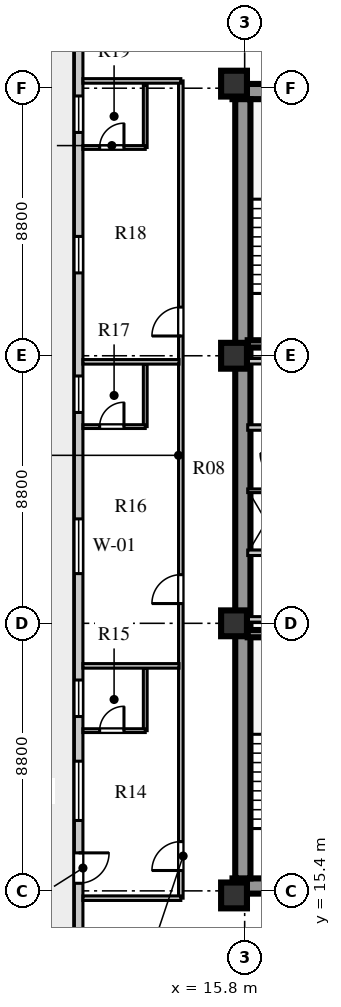
"""IFC4 building model, lengths in metres.
Left out: names, types, materials, properties, quantities, classifications, styles, units other than length and angle.
Written with IfcOpenShell. Run it as: python <this file> out.ifc"""

import sys

from ifc_helpers import new_model, si_unit, direction, frame, frame_2d, origin, origin_2d, place, context, subcontext, project, spatial, rectangle, extrude, element, fill, save


model = new_model("IFC4")
c1 = context("Model", 3, precision=1e-05, world=origin(), true_north=direction((0.0, 1.0)))
c2 = subcontext(c1, "Body", "Model", "MODEL_VIEW")
j1 = project(units=[si_unit("LENGTHUNIT", "METRE"), si_unit("PLANEANGLEUNIT", "RADIAN")], contexts=[c1])
p1 = place(None, origin())
s1 = spatial("IfcSite", under=j1, at=p1, CompositionType="ELEMENT")
p2 = place(p1, origin())
s2 = spatial("IfcBuilding", under=s1, at=p2, CompositionType="ELEMENT")
p3 = place(p2, frame((0.0, 0.0, 134.8)))
s3 = spatial("IfcBuildingStorey", under=s2, at=p3, CompositionType="ELEMENT", Elevation=134.8)
for number, where, z_axis, x_axis in (
    (1, (15.4, 15.56, 0.0), (0.0, 0.0, 1.0), (1.0, 0.0, 0.0)),
    (2, (15.4, 41.69, 0.0), (0.0, 0.0, 1.0), (1.0, 0.0, 0.0)),
):
    element("IfcWall", number, at=place(p3, frame(where, z_axis=z_axis, x_axis=x_axis)), inside=s3, PredefinedType="SHEAR", context=c2, shape_type="SweptSolid", body=[
        extrude(rectangle(XDim=9.68, YDim=0.5, at=frame_2d((4.84, 0.0))), origin(), (0.0, 0.0, 1.0), 3.6),
    ])
p4 = place(p3, frame((15.74, 15.81, 0.0), z_axis=(0.0, 0.0, 1.0), x_axis=(0.0, 1.0, 0.0)))
e3 = element("IfcWall", 3, at=p4, inside=s3, PredefinedType="SHEAR", context=c2, shape_type="SweptSolid", body=[
    extrude(rectangle(XDim=25.63, YDim=0.5, at=frame_2d((12.815, 0.0))), origin(), (0.0, 0.0, 1.0), 3.6),
])
for number, where, z_axis, x_axis in (
    (4, (15.45, 15.25, 0.0), (0.0, 0.0, 1.0), (1.0, 0.0, 0.0)),
    (5, (15.45, 24.2, 0.0), (0.0, 0.0, 1.0), (1.0, 0.0, 0.0)),
    (6, (15.45, 33.0, 0.0), (0.0, 0.0, 1.0), (1.0, 0.0, 0.0)),
    (7, (15.45, 41.95, 0.0), (0.0, 0.0, 1.0), (1.0, 0.0, 0.0)),
):
    element("IfcColumn", number, at=place(p3, frame(where, z_axis=z_axis, x_axis=x_axis)), inside=s3, PredefinedType="COLUMN", context=c2, shape_type="SweptSolid", body=[
        extrude(rectangle(XDim=0.85, YDim=0.85, at=origin_2d()), origin(), (0.0, 0.0, 1.0), 3.6),
    ])
p5 = place(p3, frame((10.34, 43.87, 0.0), z_axis=(0.0, 0.0, 1.0), x_axis=(0.0, -1.0, 0.0)))
e8 = element("IfcWall", 8, at=p5, inside=s3, PredefinedType="STANDARD", context=c2, shape_type="SweptSolid", body=[
    extrude(rectangle(XDim=30.54, YDim=0.28, at=frame_2d((15.27, 0.0))), origin(), (0.0, 0.0, 1.0), 3.6),
])
p6 = place(p5, frame((27.22, 0.0, 0.0)))
e9 = element("IfcOpeningElement", 9, at=p6, cuts=e8, PredefinedType="OPENING", context=c2, shape_type="SweptSolid", body=[
    extrude(rectangle(XDim=1.0, YDim=2.05, at=frame_2d((0.5, 1.025))), frame((0.0, 0.15, 0.0), z_axis=(0.0, -1.0, 0.0), x_axis=(1.0, 0.0, 0.0)), (0.0, 0.0, 1.0), 0.3),
])
p7 = place(p5, frame((24.205, 0.0, 0.8)))
e10 = element("IfcOpeningElement", 10, at=p7, cuts=e8, PredefinedType="OPENING", context=c2, shape_type="SweptSolid", body=[
    extrude(rectangle(XDim=1.95, YDim=2.0, at=frame_2d((0.975, 1.0))), frame((0.0, 0.15, 0.0), z_axis=(0.0, -1.0, 0.0), x_axis=(1.0, 0.0, 0.0)), (0.0, 0.0, 1.0), 0.3),
])
p8 = place(p5, frame((21.535, 0.0, 0.8)))
e11 = element("IfcOpeningElement", 11, at=p8, cuts=e8, PredefinedType="OPENING", context=c2, shape_type="SweptSolid", body=[
    extrude(rectangle(XDim=1.2, YDim=1.75, at=frame_2d((0.6, 0.875))), frame((0.0, 0.15, 0.0), z_axis=(0.0, -1.0, 0.0), x_axis=(1.0, 0.0, 0.0)), (0.0, 0.0, 1.0), 0.3),
])
p9 = place(p5, frame((16.235, 0.0, 0.8)))
e12 = element("IfcOpeningElement", 12, at=p9, cuts=e8, PredefinedType="OPENING", context=c2, shape_type="SweptSolid", body=[
    extrude(rectangle(XDim=1.8, YDim=2.0, at=frame_2d((0.9, 1.0))), frame((0.0, 0.15, 0.0), z_axis=(0.0, -1.0, 0.0), x_axis=(1.0, 0.0, 0.0)), (0.0, 0.0, 1.0), 0.3),
])
p10 = place(p5, frame((11.535, 0.0, 0.8)))
e13 = element("IfcOpeningElement", 13, at=p10, cuts=e8, PredefinedType="OPENING", context=c2, shape_type="SweptSolid", body=[
    extrude(rectangle(XDim=1.2, YDim=1.75, at=frame_2d((0.6, 0.875))), frame((0.0, 0.15, 0.0), z_axis=(0.0, -1.0, 0.0), x_axis=(1.0, 0.0, 0.0)), (0.0, 0.0, 1.0), 0.3),
])
p11 = place(p5, frame((6.945, 0.0, 0.8)))
e14 = element("IfcOpeningElement", 14, at=p11, cuts=e8, PredefinedType="OPENING", context=c2, shape_type="SweptSolid", body=[
    extrude(rectangle(XDim=1.2, YDim=1.75, at=frame_2d((0.6, 0.875))), frame((0.0, 0.15, 0.0), z_axis=(0.0, -1.0, 0.0), x_axis=(1.0, 0.0, 0.0)), (0.0, 0.0, 1.0), 0.3),
])
p12 = place(p5, frame((2.325, 0.0, 0.8)))
e15 = element("IfcOpeningElement", 15, at=p12, cuts=e8, PredefinedType="OPENING", context=c2, shape_type="SweptSolid", body=[
    extrude(rectangle(XDim=1.2, YDim=1.75, at=frame_2d((0.6, 0.875))), frame((0.0, 0.15, 0.0), z_axis=(0.0, -1.0, 0.0), x_axis=(1.0, 0.0, 0.0)), (0.0, 0.0, 1.0), 0.3),
])
p13 = place(p3, frame((15.9, 23.86, 0.0), z_axis=(0.0, 0.0, 1.0), x_axis=(1.0, 0.0, 0.0)))
e16 = element("IfcWall", 16, at=p13, inside=s3, PredefinedType="SHEAR", context=c2, shape_type="SweptSolid", body=[
    extrude(rectangle(XDim=3.52, YDim=0.24, at=frame_2d((1.76, 0.0))), origin(), (0.0, 0.0, 1.0), 3.85),
])
p14 = place(p3, frame((15.9, 26.52, 0.0), z_axis=(0.0, 0.0, 1.0), x_axis=(1.0, 0.0, 0.0)))
e17 = element("IfcWall", 17, at=p14, inside=s3, PredefinedType="SOLIDWALL", context=c2, shape_type="SweptSolid", body=[
    extrude(rectangle(XDim=8.68, YDim=0.18, at=frame_2d((4.34, 0.0))), origin(), (0.0, 0.0, 1.0), 3.6),
])
p15 = place(p14, frame((2.05, 0.0, 0.0)))
e18 = element("IfcOpeningElement", 18, at=p15, cuts=e17, PredefinedType="OPENING", context=c2, shape_type="SweptSolid", body=[
    extrude(rectangle(XDim=0.85, YDim=2.06, at=frame_2d((0.425, 1.03))), frame((0.0, 0.1, 0.0), z_axis=(0.0, -1.0, 0.0), x_axis=(1.0, 0.0, 0.0)), (0.0, 0.0, 1.0), 0.2),
])
p16 = place(p14, frame((5.2, 0.0, 0.0)))
e19 = element("IfcOpeningElement", 19, at=p16, cuts=e17, PredefinedType="OPENING", context=c2, shape_type="SweptSolid", body=[
    extrude(rectangle(XDim=0.95, YDim=2.1, at=frame_2d((0.475, 1.05))), frame((0.0, 0.1, 0.0), z_axis=(0.0, -1.0, 0.0), x_axis=(1.0, 0.0, 0.0)), (0.0, 0.0, 1.0), 0.2),
])
p17 = place(p3, frame((15.9, 24.33, 0.0), z_axis=(0.0, 0.0, 1.0), x_axis=(1.0, 0.0, 0.0)))
e20 = element("IfcWall", 20, at=p17, inside=s3, PredefinedType="SOLIDWALL", context=c2, shape_type="SweptSolid", body=[
    extrude(rectangle(XDim=8.68, YDim=0.18, at=frame_2d((4.34, 0.0))), origin(), (0.0, 0.0, 1.0), 2.95),
])
p18 = place(p3, frame((15.9, 28.56, 0.0), z_axis=(0.0, 0.0, 1.0), x_axis=(1.0, 0.0, 0.0)))
e21 = element("IfcWall", 21, at=p18, inside=s3, PredefinedType="PARTITIONING", context=c2, shape_type="SweptSolid", body=[
    extrude(rectangle(XDim=1.2, YDim=0.12, at=frame_2d((0.6, 0.0))), origin(), (0.0, 0.0, 1.0), 3.6),
])
p19 = place(p3, frame((15.9, 30.64, 0.0), z_axis=(0.0, 0.0, 1.0), x_axis=(1.0, 0.0, 0.0)))
e22 = element("IfcWall", 22, at=p19, inside=s3, PredefinedType="SOLIDWALL", context=c2, shape_type="SweptSolid", body=[
    extrude(rectangle(XDim=8.68, YDim=0.18, at=frame_2d((4.34, 0.0))), origin(), (0.0, 0.0, 1.0), 3.6),
])
p20 = place(p19, frame((1.76, 0.0, 0.0)))
e23 = element("IfcOpeningElement", 23, at=p20, cuts=e22, PredefinedType="OPENING", context=c2, shape_type="SweptSolid", body=[
    extrude(rectangle(XDim=1.0, YDim=2.1, at=frame_2d((0.5, 1.05))), frame((0.0, 0.1, 0.0), z_axis=(0.0, -1.0, 0.0), x_axis=(1.0, 0.0, 0.0)), (0.0, 0.0, 1.0), 0.2),
])
p21 = place(p19, frame((3.6, 0.0, 0.0)))
e24 = element("IfcOpeningElement", 24, at=p21, cuts=e22, PredefinedType="OPENING", context=c2, shape_type="SweptSolid", body=[
    extrude(rectangle(XDim=1.0, YDim=2.1, at=frame_2d((0.5, 1.05))), frame((0.0, 0.1, 0.0), z_axis=(0.0, -1.0, 0.0), x_axis=(1.0, 0.0, 0.0)), (0.0, 0.0, 1.0), 0.2),
])
p22 = place(p19, frame((5.44, 0.0, 0.0)))
e25 = element("IfcOpeningElement", 25, at=p22, cuts=e22, PredefinedType="OPENING", context=c2, shape_type="SweptSolid", body=[
    extrude(rectangle(XDim=1.0, YDim=2.1, at=frame_2d((0.5, 1.05))), frame((0.0, 0.1, 0.0), z_axis=(0.0, -1.0, 0.0), x_axis=(1.0, 0.0, 0.0)), (0.0, 0.0, 1.0), 0.2),
])
p23 = place(p19, frame((7.28, 0.0, 0.0)))
e26 = element("IfcOpeningElement", 26, at=p23, cuts=e22, PredefinedType="OPENING", context=c2, shape_type="SweptSolid", body=[
    extrude(rectangle(XDim=1.0, YDim=2.1, at=frame_2d((0.5, 1.05))), frame((0.0, 0.1, 0.0), z_axis=(0.0, -1.0, 0.0), x_axis=(1.0, 0.0, 0.0)), (0.0, 0.0, 1.0), 0.2),
])
p24 = place(p3, frame((15.9, 32.82, 0.0), z_axis=(0.0, 0.0, 1.0), x_axis=(1.0, 0.0, 0.0)))
e27 = element("IfcWall", 27, at=p24, inside=s3, PredefinedType="SOLIDWALL", context=c2, shape_type="SweptSolid", body=[
    extrude(rectangle(XDim=8.68, YDim=0.18, at=frame_2d((4.34, 0.0))), origin(), (0.0, 0.0, 1.0), 2.95),
])
p25 = place(p3, frame((15.9, 33.39, 0.0), z_axis=(0.0, 0.0, 1.0), x_axis=(1.0, 0.0, 0.0)))
e28 = element("IfcWall", 28, at=p25, inside=s3, PredefinedType="SHEAR", context=c2, shape_type="SweptSolid", body=[
    extrude(rectangle(XDim=3.52, YDim=0.24, at=frame_2d((1.76, 0.0))), origin(), (0.0, 0.0, 1.0), 3.85),
])
p26 = place(p3, frame((13.7, 15.16, 0.0), z_axis=(0.0, 0.0, 1.0), x_axis=(0.0, 1.0, 0.0)))
e29 = element("IfcWall", 29, at=p26, inside=s3, PredefinedType="PARTITIONING", context=c2, shape_type="SweptSolid", body=[
    extrude(rectangle(XDim=26.88, YDim=0.15, at=frame_2d((13.44, 0.0))), origin(), (0.0, 0.0, 1.0), 3.6),
])
p27 = place(p26, frame((0.91, 0.0, 0.0)))
e30 = element("IfcOpeningElement", 30, at=p27, cuts=e29, PredefinedType="OPENING", context=c2, shape_type="SweptSolid", body=[
    extrude(rectangle(XDim=0.95, YDim=2.1, at=frame_2d((0.475, 1.05))), frame((0.0, 0.085, 0.0), z_axis=(0.0, -1.0, 0.0), x_axis=(1.0, 0.0, 0.0)), (0.0, 0.0, 1.0), 0.17),
])
p28 = place(p26, frame((9.69, 0.0, 0.0)))
e31 = element("IfcOpeningElement", 31, at=p28, cuts=e29, PredefinedType="OPENING", context=c2, shape_type="SweptSolid", body=[
    extrude(rectangle(XDim=0.95, YDim=2.1, at=frame_2d((0.475, 1.05))), frame((0.0, 0.085, 0.0), z_axis=(0.0, -1.0, 0.0), x_axis=(1.0, 0.0, 0.0)), (0.0, 0.0, 1.0), 0.17),
])
p29 = place(p26, frame((18.49, 0.0, 0.0)))
e32 = element("IfcOpeningElement", 32, at=p29, cuts=e29, PredefinedType="OPENING", context=c2, shape_type="SweptSolid", body=[
    extrude(rectangle(XDim=0.95, YDim=2.1, at=frame_2d((0.475, 1.05))), frame((0.0, 0.085, 0.0), z_axis=(0.0, -1.0, 0.0), x_axis=(1.0, 0.0, 0.0)), (0.0, 0.0, 1.0), 0.17),
])
for number, where, z_axis, x_axis in (
    (33, (10.48, 15.16, 0.0), (0.0, 0.0, 1.0), (1.0, 0.0, 0.0)),
    (34, (10.48, 42.04, 0.0), (0.0, 0.0, 1.0), (1.0, 0.0, 0.0)),
):
    element("IfcWall", number, at=place(p3, frame(where, z_axis=z_axis, x_axis=x_axis)), inside=s3, PredefinedType="PARTITIONING", context=c2, shape_type="SweptSolid", body=[
        extrude(rectangle(XDim=3.22, YDim=0.15, at=frame_2d((1.61, 0.0))), origin(), (0.0, 0.0, 1.0), 3.1),
    ])
p30 = place(p3, frame((12.53, 20.67, 0.0), z_axis=(0.0, 0.0, 1.0), x_axis=(0.0, 1.0, 0.0)))
e35 = element("IfcWall", 35, at=p30, inside=s3, PredefinedType="PLUMBINGWALL", context=c2, shape_type="SweptSolid", body=[
    extrude(rectangle(XDim=2.05, YDim=0.125, at=frame_2d((1.025, 0.0))), origin(), (0.0, 0.0, 1.0), 3.6),
])
p31 = place(p3, frame((10.48, 20.67, 0.0), z_axis=(0.0, 0.0, 1.0), x_axis=(1.0, 0.0, 0.0)))
e36 = element("IfcWall", 36, at=p31, inside=s3, PredefinedType="PLUMBINGWALL", context=c2, shape_type="SweptSolid", body=[
    extrude(rectangle(XDim=2.05, YDim=0.125, at=frame_2d((1.025, 0.0))), origin(), (0.0, 0.0, 1.0), 3.6),
])
p32 = place(p31, frame((0.55, 0.0, 0.0)))
e37 = element("IfcOpeningElement", 37, at=p32, cuts=e36, PredefinedType="OPENING", context=c2, shape_type="SweptSolid", body=[
    extrude(rectangle(XDim=0.8, YDim=2.05, at=frame_2d((0.4, 1.025))), frame((0.0, 0.073, 0.0), z_axis=(0.0, -1.0, 0.0), x_axis=(1.0, 0.0, 0.0)), (0.0, 0.0, 1.0), 0.145),
])
p33 = place(p3, frame((10.48, 22.8, 0.0), z_axis=(0.0, 0.0, 1.0), x_axis=(1.0, 0.0, 0.0)))
e38 = element("IfcWall", 38, at=p33, inside=s3, PredefinedType="PARTITIONING", context=c2, shape_type="SweptSolid", body=[
    extrude(rectangle(XDim=3.16, YDim=0.15, at=frame_2d((1.58, 0.0))), origin(), (0.0, 0.0, 1.0), 3.6),
])
p34 = place(p3, frame((12.53, 30.67, 0.0), z_axis=(0.0, 0.0, 1.0), x_axis=(0.0, 1.0, 0.0)))
e39 = element("IfcWall", 39, at=p34, inside=s3, PredefinedType="PLUMBINGWALL", context=c2, shape_type="SweptSolid", body=[
    extrude(rectangle(XDim=2.05, YDim=0.125, at=frame_2d((1.025, 0.0))), origin(), (0.0, 0.0, 1.0), 3.6),
])
p35 = place(p3, frame((10.48, 30.67, 0.0), z_axis=(0.0, 0.0, 1.0), x_axis=(1.0, 0.0, 0.0)))
e40 = element("IfcWall", 40, at=p35, inside=s3, PredefinedType="PLUMBINGWALL", context=c2, shape_type="SweptSolid", body=[
    extrude(rectangle(XDim=2.05, YDim=0.125, at=frame_2d((1.025, 0.0))), origin(), (0.0, 0.0, 1.0), 3.6),
])
p36 = place(p35, frame((0.55, 0.0, 0.0)))
e41 = element("IfcOpeningElement", 41, at=p36, cuts=e40, PredefinedType="OPENING", context=c2, shape_type="SweptSolid", body=[
    extrude(rectangle(XDim=0.8, YDim=2.05, at=frame_2d((0.4, 1.025))), frame((0.0, 0.073, 0.0), z_axis=(0.0, -1.0, 0.0), x_axis=(1.0, 0.0, 0.0)), (0.0, 0.0, 1.0), 0.145),
])
p37 = place(p3, frame((10.48, 32.8, 0.0), z_axis=(0.0, 0.0, 1.0), x_axis=(1.0, 0.0, 0.0)))
e42 = element("IfcWall", 42, at=p37, inside=s3, PredefinedType="PARTITIONING", context=c2, shape_type="SweptSolid", body=[
    extrude(rectangle(XDim=3.16, YDim=0.15, at=frame_2d((1.58, 0.0))), origin(), (0.0, 0.0, 1.0), 3.1),
])
p38 = place(p3, frame((12.53, 39.85, 0.0), z_axis=(0.0, 0.0, 1.0), x_axis=(0.0, 1.0, 0.0)))
e43 = element("IfcWall", 43, at=p38, inside=s3, PredefinedType="PLUMBINGWALL", context=c2, shape_type="SweptSolid", body=[
    extrude(rectangle(XDim=2.05, YDim=0.125, at=frame_2d((1.025, 0.0))), origin(), (0.0, 0.0, 1.0), 3.6),
])
p39 = place(p3, frame((10.48, 39.85, 0.0), z_axis=(0.0, 0.0, 1.0), x_axis=(1.0, 0.0, 0.0)))
e44 = element("IfcWall", 44, at=p39, inside=s3, PredefinedType="PLUMBINGWALL", context=c2, shape_type="SweptSolid", body=[
    extrude(rectangle(XDim=2.05, YDim=0.125, at=frame_2d((1.025, 0.0))), origin(), (0.0, 0.0, 1.0), 3.6),
])
p40 = place(p39, frame((0.55, 0.0, 0.0)))
e45 = element("IfcOpeningElement", 45, at=p40, cuts=e44, PredefinedType="OPENING", context=c2, shape_type="SweptSolid", body=[
    extrude(rectangle(XDim=0.8, YDim=2.05, at=frame_2d((0.4, 1.025))), frame((0.0, 0.073, 0.0), z_axis=(0.0, -1.0, 0.0), x_axis=(1.0, 0.0, 0.0)), (0.0, 0.0, 1.0), 0.145),
])
p41 = place(p6, frame((1.0, 0.0, 0.0), z_axis=(0.0, 0.0, 1.0), x_axis=(-1.0, 0.0, 0.0)))
e46 = element("IfcDoor", 46, at=p41, inside=s3, OperationType="SINGLE_SWING_RIGHT", PredefinedType="DOOR", context=c2, shape_type="SweptSolid", body=[
    extrude(rectangle(XDim=1.0, YDim=2.05, at=frame_2d((0.5, 1.025))), frame((0.0, 0.025, 0.0), z_axis=(0.0, -1.0, 0.0), x_axis=(1.0, 0.0, 0.0)), (0.0, 0.0, 1.0), 0.05),
])
fill(e9, e46)
p42 = place(p7, origin())
e47 = element("IfcWindow", 47, at=p42, inside=s3, PartitioningType="SINGLE_PANEL", PredefinedType="WINDOW", context=c2, shape_type="SweptSolid", body=[
    extrude(rectangle(XDim=1.95, YDim=2.0, at=frame_2d((0.975, 1.0))), frame((0.0, 0.03, 0.0), z_axis=(0.0, -1.0, 0.0), x_axis=(1.0, 0.0, 0.0)), (0.0, 0.0, 1.0), 0.06),
])
fill(e10, e47)
p43 = place(p8, origin())
e48 = element("IfcWindow", 48, at=p43, inside=s3, PartitioningType="SINGLE_PANEL", PredefinedType="WINDOW", context=c2, shape_type="SweptSolid", body=[
    extrude(rectangle(XDim=1.2, YDim=1.75, at=frame_2d((0.6, 0.875))), frame((0.0, 0.03, 0.0), z_axis=(0.0, -1.0, 0.0), x_axis=(1.0, 0.0, 0.0)), (0.0, 0.0, 1.0), 0.06),
])
fill(e11, e48)
p44 = place(p9, origin())
e49 = element("IfcWindow", 49, at=p44, inside=s3, PartitioningType="SINGLE_PANEL", PredefinedType="WINDOW", context=c2, shape_type="SweptSolid", body=[
    extrude(rectangle(XDim=1.8, YDim=2.0, at=frame_2d((0.9, 1.0))), frame((0.0, 0.03, 0.0), z_axis=(0.0, -1.0, 0.0), x_axis=(1.0, 0.0, 0.0)), (0.0, 0.0, 1.0), 0.06),
])
fill(e12, e49)
p45 = place(p10, origin())
e50 = element("IfcWindow", 50, at=p45, inside=s3, PartitioningType="SINGLE_PANEL", PredefinedType="WINDOW", context=c2, shape_type="SweptSolid", body=[
    extrude(rectangle(XDim=1.2, YDim=1.75, at=frame_2d((0.6, 0.875))), frame((0.0, 0.03, 0.0), z_axis=(0.0, -1.0, 0.0), x_axis=(1.0, 0.0, 0.0)), (0.0, 0.0, 1.0), 0.06),
])
fill(e13, e50)
p46 = place(p11, origin())
e51 = element("IfcWindow", 51, at=p46, inside=s3, PartitioningType="SINGLE_PANEL", PredefinedType="WINDOW", context=c2, shape_type="SweptSolid", body=[
    extrude(rectangle(XDim=1.2, YDim=1.75, at=frame_2d((0.6, 0.875))), frame((0.0, 0.03, 0.0), z_axis=(0.0, -1.0, 0.0), x_axis=(1.0, 0.0, 0.0)), (0.0, 0.0, 1.0), 0.06),
])
fill(e14, e51)
p47 = place(p12, origin())
e52 = element("IfcWindow", 52, at=p47, inside=s3, PartitioningType="SINGLE_PANEL", PredefinedType="WINDOW", context=c2, shape_type="SweptSolid", body=[
    extrude(rectangle(XDim=1.2, YDim=1.75, at=frame_2d((0.6, 0.875))), frame((0.0, 0.03, 0.0), z_axis=(0.0, -1.0, 0.0), x_axis=(1.0, 0.0, 0.0)), (0.0, 0.0, 1.0), 0.06),
])
fill(e15, e52)
p48 = place(p27, origin())
e53 = element("IfcDoor", 53, at=p48, inside=s3, OperationType="SINGLE_SWING_LEFT", PredefinedType="DOOR", context=c2, shape_type="SweptSolid", body=[
    extrude(rectangle(XDim=0.95, YDim=2.1, at=frame_2d((0.475, 1.05))), frame((0.0, 0.025, 0.0), z_axis=(0.0, -1.0, 0.0), x_axis=(1.0, 0.0, 0.0)), (0.0, 0.0, 1.0), 0.05),
])
fill(e30, e53)
p49 = place(p32, frame((0.8, 0.0, 0.0), z_axis=(0.0, 0.0, 1.0), x_axis=(-1.0, 0.0, 0.0)))
e54 = element("IfcDoor", 54, at=p49, inside=s3, OperationType="SINGLE_SWING_LEFT", PredefinedType="DOOR", context=c2, shape_type="SweptSolid", body=[
    extrude(rectangle(XDim=0.8, YDim=2.05, at=frame_2d((0.4, 1.025))), frame((0.0, 0.025, 0.0), z_axis=(0.0, -1.0, 0.0), x_axis=(1.0, 0.0, 0.0)), (0.0, 0.0, 1.0), 0.05),
])
fill(e37, e54)
p50 = place(p28, origin())
e55 = element("IfcDoor", 55, at=p50, inside=s3, OperationType="SINGLE_SWING_LEFT", PredefinedType="DOOR", context=c2, shape_type="SweptSolid", body=[
    extrude(rectangle(XDim=0.95, YDim=2.1, at=frame_2d((0.475, 1.05))), frame((0.0, 0.025, 0.0), z_axis=(0.0, -1.0, 0.0), x_axis=(1.0, 0.0, 0.0)), (0.0, 0.0, 1.0), 0.05),
])
fill(e31, e55)
p51 = place(p36, frame((0.8, 0.0, 0.0), z_axis=(0.0, 0.0, 1.0), x_axis=(-1.0, 0.0, 0.0)))
e56 = element("IfcDoor", 56, at=p51, inside=s3, OperationType="SINGLE_SWING_LEFT", PredefinedType="DOOR", context=c2, shape_type="SweptSolid", body=[
    extrude(rectangle(XDim=0.8, YDim=2.05, at=frame_2d((0.4, 1.025))), frame((0.0, 0.025, 0.0), z_axis=(0.0, -1.0, 0.0), x_axis=(1.0, 0.0, 0.0)), (0.0, 0.0, 1.0), 0.05),
])
fill(e41, e56)
p52 = place(p29, origin())
e57 = element("IfcDoor", 57, at=p52, inside=s3, OperationType="SINGLE_SWING_LEFT", PredefinedType="DOOR", context=c2, shape_type="SweptSolid", body=[
    extrude(rectangle(XDim=0.95, YDim=2.1, at=frame_2d((0.475, 1.05))), frame((0.0, 0.025, 0.0), z_axis=(0.0, -1.0, 0.0), x_axis=(1.0, 0.0, 0.0)), (0.0, 0.0, 1.0), 0.05),
])
fill(e32, e57)
p53 = place(p40, frame((0.8, 0.0, 0.0), z_axis=(0.0, 0.0, 1.0), x_axis=(-1.0, 0.0, 0.0)))
e58 = element("IfcDoor", 58, at=p53, inside=s3, OperationType="SINGLE_SWING_LEFT", PredefinedType="DOOR", context=c2, shape_type="SweptSolid", body=[
    extrude(rectangle(XDim=0.8, YDim=2.05, at=frame_2d((0.4, 1.025))), frame((0.0, 0.025, 0.0), z_axis=(0.0, -1.0, 0.0), x_axis=(1.0, 0.0, 0.0)), (0.0, 0.0, 1.0), 0.05),
])
fill(e45, e58)
save(model, sys.argv[1])
